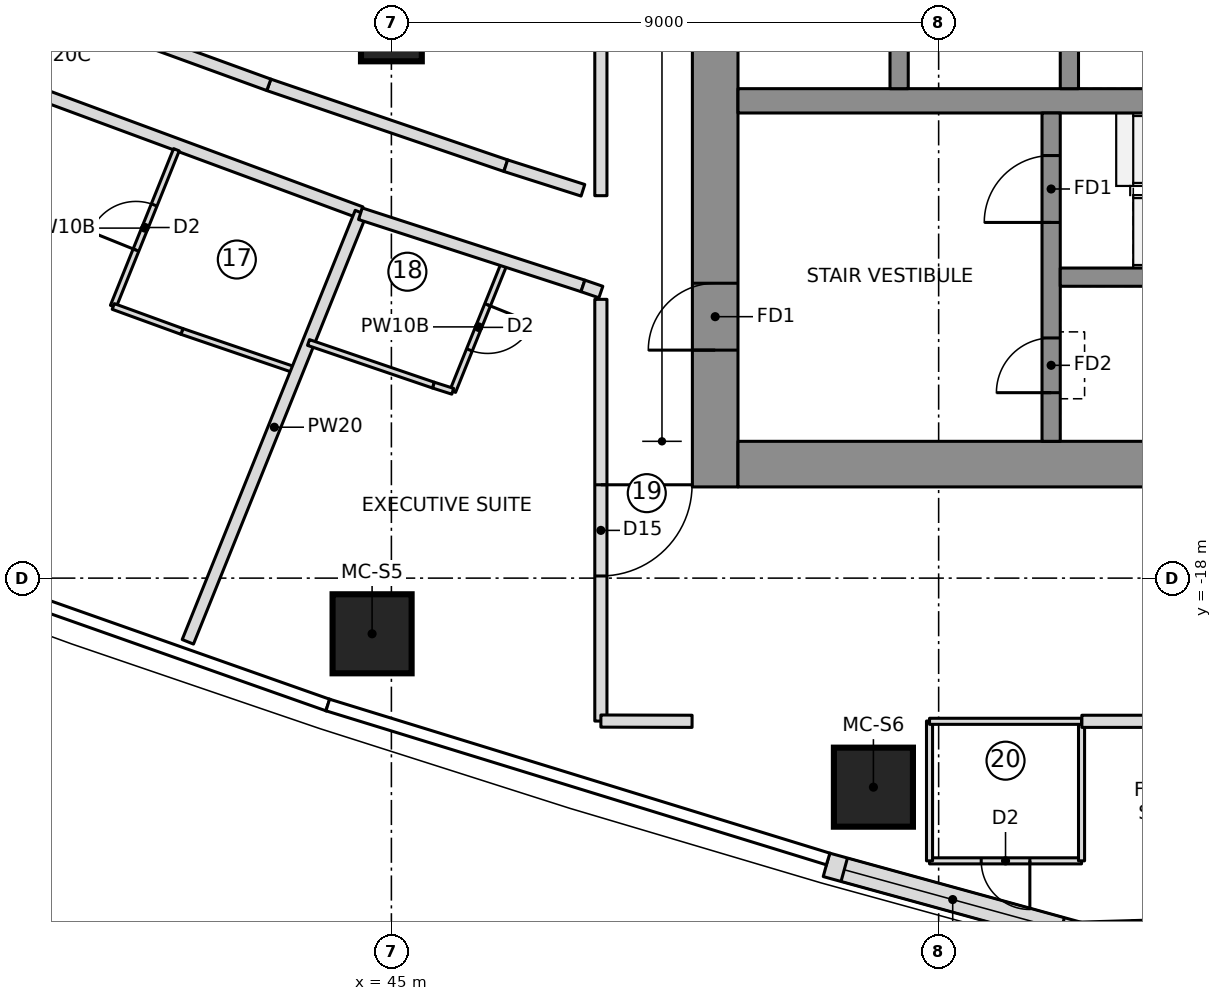
"""IFC4 building model, lengths in metres.
Left out: names, types, materials, properties, quantities, classifications, styles, units other than length and angle.
Written with IfcOpenShell. Run it as: python <this file> out.ifc"""

import sys

from ifc_helpers import new_model, si_unit, direction, frame, frame_2d, origin, origin_2d, place, context, subcontext, project, spatial, polyline, rectangle, outline, extrude, element, fill, save


model = new_model("IFC4")
c1 = context("Model", 3, precision=1e-05, world=origin(), true_north=direction((0.0, 1.0)))
c2 = subcontext(c1, "Body", "Model", "MODEL_VIEW")
j1 = project(units=[si_unit("LENGTHUNIT", "METRE"), si_unit("PLANEANGLEUNIT", "RADIAN")], contexts=[c1])
p1 = place(None, origin())
s1 = spatial("IfcSite", under=j1, at=p1, CompositionType="ELEMENT")
p2 = place(p1, origin())
s2 = spatial("IfcBuilding", under=s1, at=p2, CompositionType="ELEMENT")
p3 = place(p2, frame((0.0, 0.0, 189.7)))
s3 = spatial("IfcBuildingStorey", under=s2, at=p3, CompositionType="ELEMENT", Elevation=189.7)
p4 = place(p3, frame((50.325, -16.5, 0.0), z_axis=(0.0, 0.0, 1.0), x_axis=(0.0, 1.0, 0.0)))
e1 = element("IfcWall", 1, at=p4, inside=s3, PredefinedType="SHEAR", context=c2, shape_type="SweptSolid", body=[
    extrude(rectangle(XDim=9.85, YDim=0.75, at=frame_2d((4.925, 0.0))), origin(), (0.0, 0.0, 1.0), 3.55),
])
p5 = place(p4, frame((2.25, 0.0, 0.0)))
e2 = element("IfcOpeningElement", 2, at=p5, cuts=e1, PredefinedType="OPENING", context=c2, shape_type="SweptSolid", body=[
    extrude(rectangle(XDim=1.1, YDim=2.1, at=frame_2d((0.55, 1.05))), frame((0.0, 0.385, 0.0), z_axis=(0.0, -1.0, 0.0), x_axis=(1.0, 0.0, 0.0)), (0.0, 0.0, 1.0), 0.77),
])
p6 = place(p3, frame((50.7, -16.125, 0.0), z_axis=(0.0, 0.0, 1.0), x_axis=(1.0, 0.0, 0.0)))
e3 = element("IfcWall", 3, at=p6, inside=s3, PredefinedType="SHEAR", context=c2, shape_type="SweptSolid", body=[
    extrude(rectangle(XDim=13.77, YDim=0.75, at=frame_2d((6.885, 0.0))), origin(), (0.0, 0.0, 1.0), 3.55),
])
p7 = place(p3, frame((50.7, -10.15, 0.0), z_axis=(0.0, 0.0, 1.0), x_axis=(1.0, 0.0, 0.0)))
e4 = element("IfcWall", 4, at=p7, inside=s3, PredefinedType="SHEAR", context=c2, shape_type="SweptSolid", body=[
    extrude(rectangle(XDim=13.02, YDim=0.4, at=frame_2d((6.51, 0.0))), origin(), (0.0, 0.0, 1.0), 3.55),
])
for number, where, z_axis, x_axis in (
    (5, (53.35, -9.95, 0.0), (0.0, 0.0, 1.0), (0.0, 1.0, 0.0)),
    (6, (56.15, -9.95, 0.0), (0.0, 0.0, 1.0), (0.0, 1.0, 0.0)),
):
    element("IfcWall", number, at=place(p3, frame(where, z_axis=z_axis, x_axis=x_axis)), inside=s3, PredefinedType="SHEAR", context=c2, shape_type="SweptSolid", body=[
        extrude(rectangle(XDim=3.0, YDim=0.3, at=frame_2d((1.5, 0.0))), origin(), (0.0, 0.0, 1.0), 3.55),
    ])
p8 = place(p3, frame((55.85, -15.75, 0.0), z_axis=(0.0, 0.0, 1.0), x_axis=(0.0, 1.0, 0.0)))
e7 = element("IfcWall", 7, at=p8, inside=s3, PredefinedType="SHEAR", context=c2, shape_type="SweptSolid", body=[
    extrude(rectangle(XDim=5.4, YDim=0.3, at=frame_2d((2.7, 0.0))), origin(), (0.0, 0.0, 1.0), 3.55),
])
p9 = place(p8, frame((3.6, 0.0, 0.0)))
e8 = element("IfcOpeningElement", 8, at=p9, cuts=e7, PredefinedType="OPENING", context=c2, shape_type="SweptSolid", body=[
    extrude(rectangle(XDim=1.1, YDim=2.1, at=frame_2d((0.55, 1.05))), frame((0.0, 0.16, 0.0), z_axis=(0.0, -1.0, 0.0), x_axis=(1.0, 0.0, 0.0)), (0.0, 0.0, 1.0), 0.32),
])
p10 = place(p8, frame((0.8, 0.0, 0.0)))
e9 = element("IfcOpeningElement", 9, at=p10, cuts=e7, PredefinedType="OPENING", context=c2, shape_type="SweptSolid", body=[
    extrude(rectangle(XDim=0.9, YDim=2.1, at=frame_2d((0.45, 1.05))), frame((0.0, 0.16, 0.0), z_axis=(0.0, -1.0, 0.0), x_axis=(1.0, 0.0, 0.0)), (0.0, 0.0, 1.0), 0.32),
])
p11 = place(p3, frame((56.0, -13.05, 0.0), z_axis=(0.0, 0.0, 1.0), x_axis=(1.0, 0.0, 0.0)))
e10 = element("IfcWall", 10, at=p11, inside=s3, PredefinedType="SHEAR", context=c2, shape_type="SweptSolid", body=[
    extrude(rectangle(XDim=7.72, YDim=0.3, at=frame_2d((3.86, 0.0))), origin(), (0.0, 0.0, 1.0), 3.55),
])
for number, where, z_axis, x_axis in (
    (11, (44.683, -18.916, 0.0), (0.0, 0.0, 1.0), (1.0, 0.0, 0.0)),
    (12, (52.927, -21.438, 0.0), (0.0, 0.0, 1.0), (1.0, 0.0, 0.0)),
):
    element("IfcColumn", number, at=place(p3, frame(where, z_axis=z_axis, x_axis=x_axis)), inside=s3, PredefinedType="COLUMN", context=c2, shape_type="SweptSolid", body=[
        extrude(rectangle(XDim=1.3, YDim=1.3, at=origin_2d()), origin(), (0.0, 0.0, 1.0), 3.55),
    ])
p12 = place(p3, frame((45.0, -9.0, 0.0), z_axis=(0.0, 0.0, 1.0), x_axis=(1.0, 0.0, 0.0)))
e13 = element("IfcColumn", 13, at=p12, inside=s3, PredefinedType="COLUMN", context=c2, shape_type="SweptSolid", body=[
    extrude(rectangle(XDim=1.0, YDim=1.0, at=origin_2d()), origin(), (0.0, 0.0, 1.0), 3.55),
])
p13 = place(p3, frame((52.155, -22.716, 0.0), z_axis=(0.0, 0.0, 1.0), x_axis=(0.964205755089, -0.265155165617, 0.0)))
e14 = element("IfcWall", 14, at=p13, inside=s3, PredefinedType="NOTDEFINED", context=c2, shape_type="SweptSolid", body=[
    extrude(outline(polyline([(0.0, -0.2), (4.337, -0.2), (4.277, 0.2), (0.0, 0.2), (0.0, -0.2)])), origin(), (0.0, 0.0, 1.0), 3.25),
])
p14 = place(p13, frame((0.303, 0.0, 0.9)))
e15 = element("IfcOpeningElement", 15, at=p14, cuts=e14, PredefinedType="OPENING", context=c2, shape_type="SweptSolid", body=[
    extrude(rectangle(XDim=3.7, YDim=1.8, at=frame_2d((1.85, 0.9))), frame((0.0, 0.21, 0.0), z_axis=(0.0, -1.0, 0.0), x_axis=(1.0, 0.0, 0.0)), (0.0, 0.0, 1.0), 0.42),
])
p15 = place(p3, frame((56.308, -23.858, 0.0), z_axis=(0.0, 0.0, 1.0), x_axis=(0.999587920197, 0.028705222472, 0.0)))
e16 = element("IfcWall", 16, at=p15, inside=s3, PredefinedType="NOTDEFINED", context=c2, shape_type="SweptSolid", body=[
    extrude(outline(polyline([(-0.03, -0.2), (3.989, -0.2), (3.87, 0.2), (0.03, 0.2), (-0.03, -0.2)])), origin(), (0.0, 0.0, 1.0), 3.25),
])
p16 = place(p15, frame((0.865, 0.0, 0.6)))
e17 = element("IfcOpeningElement", 17, at=p16, cuts=e16, PredefinedType="OPENING", context=c2, shape_type="SweptSolid", body=[
    extrude(outline(polyline([(0.0, 1.35), (0.084, 1.771), (0.322, 2.128), (0.679, 2.366), (1.1, 2.45), (1.521, 2.366), (1.878, 2.128), (2.116, 1.771), (2.2, 1.35), (2.2, 1.1), (2.116, 0.679), (1.878, 0.322), (1.521, 0.084), (1.1, 0.0), (0.679, 0.084), (0.322, 0.322), (0.084, 0.679), (0.0, 1.1), (0.0, 1.35)])), frame((0.0, 0.21, 0.0), z_axis=(0.0, -1.0, 0.0), x_axis=(1.0, 0.0, 0.0)), (0.0, 0.0, 1.0), 0.42),
])
p17 = place(p3, frame((56.35, -22.65, 0.0), z_axis=(0.0, 0.0, 1.0), x_axis=(-1.0, 0.0, 0.0)))
e18 = element("IfcWall", 18, at=p17, inside=s3, PredefinedType="PARTITIONING", context=c2, shape_type="SweptSolid", body=[
    extrude(rectangle(XDim=2.5, YDim=0.1, at=frame_2d((1.25, 0.0))), origin(), (0.0, 0.0, 1.0), 3.25),
])
p18 = place(p17, frame((0.85, 0.0, 0.0)))
e19 = element("IfcOpeningElement", 19, at=p18, cuts=e18, PredefinedType="OPENING", context=c2, shape_type="SweptSolid", body=[
    extrude(rectangle(XDim=0.8, YDim=2.1, at=frame_2d((0.4, 1.05))), frame((0.0, 0.06, 0.0), z_axis=(0.0, -1.0, 0.0), x_axis=(1.0, 0.0, 0.0)), (0.0, 0.0, 1.0), 0.12),
])
for number, where, z_axis, x_axis in (
    (20, (53.85, -22.65, 0.0), (0.0, 0.0, 1.0), (0.0, 1.0, 0.0)),
    (21, (56.35, -20.35, 0.0), (0.0, 0.0, 1.0), (0.0, -1.0, 0.0)),
):
    element("IfcWall", number, at=place(p3, frame(where, z_axis=z_axis, x_axis=x_axis)), inside=s3, PredefinedType="PARTITIONING", context=c2, shape_type="SweptSolid", body=[
        extrude(rectangle(XDim=2.3, YDim=0.1, at=frame_2d((1.15, 0.0))), origin(), (0.0, 0.0, 1.0), 3.25),
    ])
p19 = place(p3, frame((33.801, -8.032, 0.0), z_axis=(0.0, 0.0, 1.0), x_axis=(0.937916242759, -0.346861819127, 0.0)))
e22 = element("IfcWall", 22, at=p19, inside=s3, PredefinedType="PARTITIONING", context=c2, shape_type="SweptSolid", body=[
    extrude(rectangle(XDim=11.405, YDim=0.2, at=frame_2d((5.702, 0.0))), origin(), (0.0, 0.0, 1.0), 3.25),
])
p20 = place(p19, frame((1.15, 0.0, 0.0)))
e23 = element("IfcOpeningElement", 23, at=p20, cuts=e22, PredefinedType="OPENING", context=c2, shape_type="SweptSolid", body=[
    extrude(rectangle(XDim=1.0, YDim=2.1, at=frame_2d((0.5, 1.05))), frame((0.0, 0.11, 0.0), z_axis=(0.0, -1.0, 0.0), x_axis=(1.0, 0.0, 0.0)), (0.0, 0.0, 1.0), 0.22),
])
p21 = place(p3, frame((40.426, -13.532, 0.0), z_axis=(0.0, 0.0, 1.0), x_axis=(0.373889095325, 0.927473419779, 0.0)))
e24 = element("IfcWall", 24, at=p21, inside=s3, PredefinedType="PARTITIONING", context=c2, shape_type="SweptSolid", body=[
    extrude(rectangle(XDim=2.778, YDim=0.1, at=frame_2d((1.389, 0.0))), origin(), (0.0, 0.0, 1.0), 3.25),
])
p22 = place(p21, frame((1.0, 0.0, 0.0)))
e25 = element("IfcOpeningElement", 25, at=p22, cuts=e24, PredefinedType="OPENING", context=c2, shape_type="SweptSolid", body=[
    extrude(rectangle(XDim=0.8, YDim=2.1, at=frame_2d((0.4, 1.05))), frame((0.0, 0.06, 0.0), z_axis=(0.0, -1.0, 0.0), x_axis=(1.0, 0.0, 0.0)), (0.0, 0.0, 1.0), 0.12),
])
p23 = place(p3, frame((43.449, -14.589, 0.0), z_axis=(0.0, 0.0, 1.0), x_axis=(-0.94641533286, 0.322952036265, 0.0)))
e26 = element("IfcWall", 26, at=p23, inside=s3, PredefinedType="PARTITIONING", context=c2, shape_type="SweptSolid", body=[
    extrude(rectangle(XDim=2.002, YDim=0.1, at=frame_2d((1.001, 0.0))), origin(), (0.0, 0.0, 1.0), 3.25),
])
p24 = place(p3, frame((41.555, -13.943, 0.0), z_axis=(0.0, 0.0, 1.0), x_axis=(-0.939781557461, 0.341775692897, 0.0)))
e27 = element("IfcWall", 27, at=p24, inside=s3, PredefinedType="PARTITIONING", context=c2, shape_type="SweptSolid", body=[
    extrude(rectangle(XDim=1.201, YDim=0.1, at=frame_2d((0.601, 0.0))), origin(), (0.0, 0.0, 1.0), 3.25),
])
p25 = place(p3, frame((41.652, -19.048, 0.0), z_axis=(0.0, 0.0, 1.0), x_axis=(0.373877998371, 0.927477893178, 0.0)))
e28 = element("IfcWall", 28, at=p25, inside=s3, PredefinedType="PARTITIONING", context=c2, shape_type="SweptSolid", body=[
    extrude(rectangle(XDim=7.611, YDim=0.2, at=frame_2d((3.806, 0.0))), origin(), (0.0, 0.0, 1.0), 3.25),
])
p26 = place(p3, frame((46.863, -12.809, 0.0), z_axis=(0.0, 0.0, 1.0), x_axis=(-0.373877855241, -0.927477950876, 0.0)))
e29 = element("IfcWall", 29, at=p26, inside=s3, PredefinedType="PARTITIONING", context=c2, shape_type="SweptSolid", body=[
    extrude(rectangle(XDim=2.283, YDim=0.1, at=frame_2d((1.142, 0.0))), origin(), (0.0, 0.0, 1.0), 3.25),
])
p27 = place(p26, frame((0.75, 0.0, 0.0)))
e30 = element("IfcOpeningElement", 30, at=p27, cuts=e29, PredefinedType="OPENING", context=c2, shape_type="SweptSolid", body=[
    extrude(rectangle(XDim=0.8, YDim=2.1, at=frame_2d((0.4, 1.05))), frame((0.0, 0.06, 0.0), z_axis=(0.0, -1.0, 0.0), x_axis=(1.0, 0.0, 0.0)), (0.0, 0.0, 1.0), 0.12),
])
p28 = place(p3, frame((46.009, -14.927, 0.0), z_axis=(0.0, 0.0, 1.0), x_axis=(-0.952618746207, 0.304166935045, 0.0)))
e31 = element("IfcWall", 31, at=p28, inside=s3, PredefinedType="PARTITIONING", context=c2, shape_type="SweptSolid", body=[
    extrude(rectangle(XDim=0.335, YDim=0.1, at=frame_2d((0.167, 0.0))), origin(), (0.0, 0.0, 1.0), 3.25),
])
p29 = place(p3, frame((45.69, -14.825, 0.0), z_axis=(0.0, 0.0, 1.0), x_axis=(-0.946442988685, 0.322870979136, 0.0)))
e32 = element("IfcWall", 32, at=p29, inside=s3, PredefinedType="PARTITIONING", context=c2, shape_type="SweptSolid", body=[
    extrude(rectangle(XDim=2.169, YDim=0.1, at=frame_2d((1.085, 0.0))), origin(), (0.0, 0.0, 1.0), 3.25),
])
for number, where, z_axis, x_axis in (
    (33, (46.881, -11.217, 0.0), (0.0, 0.0, 1.0), (-0.946, 0.323, 0.0)),
    (34, (42.984, -9.887, 0.0), (0.0, 0.0, 1.0), (-0.94, 0.342, 0.0)),
):
    element("IfcWall", number, at=place(p3, frame(where, z_axis=z_axis, x_axis=x_axis)), inside=s3, PredefinedType="PARTITIONING", context=c2, shape_type="SweptSolid", body=[
        extrude(rectangle(XDim=4.117, YDim=0.2, at=frame_2d((2.059, 0.0))), origin(), (0.0, 0.0, 1.0), 3.25),
    ])
p30 = place(p3, frame((56.355, -20.355, 0.0), z_axis=(0.0, 0.0, 1.0), x_axis=(1.0, 0.0, 0.0)))
e35 = element("IfcWall", 35, at=p30, inside=s3, PredefinedType="PARTITIONING", context=c2, shape_type="SweptSolid", body=[
    extrude(rectangle(XDim=7.354, YDim=0.2, at=frame_2d((3.677, 0.0))), origin(), (0.0, 0.0, 1.0), 3.25),
])
p31 = place(p30, frame((2.624, 0.0, 0.0)))
e36 = element("IfcOpeningElement", 36, at=p31, cuts=e35, PredefinedType="OPENING", context=c2, shape_type="SweptSolid", body=[
    extrude(rectangle(XDim=1.5, YDim=2.1, at=frame_2d((0.75, 1.05))), frame((0.0, 0.11, 0.0), z_axis=(0.0, -1.0, 0.0), x_axis=(1.0, 0.0, 0.0)), (0.0, 0.0, 1.0), 0.22),
])
p32 = place(p3, frame((53.85, -20.355, 0.0), z_axis=(0.0, 0.0, 1.0), x_axis=(1.0, 0.0, 0.0)))
e37 = element("IfcWall", 37, at=p32, inside=s3, PredefinedType="PARTITIONING", context=c2, shape_type="SweptSolid", body=[
    extrude(rectangle(XDim=2.5, YDim=0.1, at=frame_2d((1.25, 0.0))), origin(), (0.0, 0.0, 1.0), 3.25),
])
p33 = place(p3, frame((44.49, -12.007, 0.0), z_axis=(0.0, 0.0, 1.0), x_axis=(0.951228355446, -0.308487626648, 0.0)))
e38 = element("IfcWall", 38, at=p33, inside=s3, PredefinedType="PARTITIONING", context=c2, shape_type="SweptSolid", body=[
    extrude(rectangle(XDim=3.847, YDim=0.2, at=frame_2d((1.924, 0.0))), origin(), (0.0, 0.0, 1.0), 3.25),
])
p34 = place(p3, frame((48.15, -11.621, 0.0), z_axis=(0.0, 0.0, 1.0), x_axis=(-0.952761948983, 0.303718074157, 0.0)))
e39 = element("IfcWall", 39, at=p34, inside=s3, PredefinedType="PARTITIONING", context=c2, shape_type="SweptSolid", body=[
    extrude(rectangle(XDim=1.332, YDim=0.2, at=frame_2d((0.666, 0.0))), origin(), (0.0, 0.0, 1.0), 3.25),
])
p35 = place(p3, frame((48.445, 11.71, 0.0), z_axis=(0.0, 0.0, 1.0), x_axis=(0.0, -1.0, 0.0)))
e40 = element("IfcWall", 40, at=p35, inside=s3, PredefinedType="PARTITIONING", context=c2, shape_type="SweptSolid", body=[
    extrude(rectangle(XDim=23.42, YDim=0.2, at=frame_2d((11.71, 0.0))), origin(), (0.0, 0.0, 1.0), 3.25),
])
p36 = place(p3, frame((48.15, -13.194, 0.0), z_axis=(0.0, 0.0, 1.0), x_axis=(0.946069343286, -0.323964191994, 0.0)))
e41 = element("IfcWall", 41, at=p36, inside=s3, PredefinedType="PARTITIONING", context=c2, shape_type="SweptSolid", body=[
    extrude(rectangle(XDim=0.312, YDim=0.2, at=frame_2d((0.156, 0.0))), origin(), (0.0, 0.0, 1.0), 3.25),
])
p37 = place(p3, frame((48.445, -13.415, 0.0), z_axis=(0.0, 0.0, 1.0), x_axis=(0.0, -1.0, 0.0)))
e42 = element("IfcWall", 42, at=p37, inside=s3, PredefinedType="PARTITIONING", context=c2, shape_type="SweptSolid", body=[
    extrude(rectangle(XDim=6.936, YDim=0.2, at=frame_2d((3.468, 0.0))), origin(), (0.0, 0.0, 1.0), 3.25),
])
p38 = place(p37, frame((3.05, 0.0, 0.0)))
e43 = element("IfcOpeningElement", 43, at=p38, cuts=e42, PredefinedType="OPENING", context=c2, shape_type="SweptSolid", body=[
    extrude(rectangle(XDim=1.5, YDim=2.1, at=frame_2d((0.75, 1.05))), frame((0.0, 0.11, 0.0), z_axis=(0.0, -1.0, 0.0), x_axis=(1.0, 0.0, 0.0)), (0.0, 0.0, 1.0), 0.22),
])
p39 = place(p3, frame((48.445, -20.351, 0.0), z_axis=(0.0, 0.0, 1.0), x_axis=(0.999996609175, -0.002604157836, 0.0)))
e44 = element("IfcWall", 44, at=p39, inside=s3, PredefinedType="PARTITIONING", context=c2, shape_type="SweptSolid", body=[
    extrude(rectangle(XDim=1.5, YDim=0.2, at=frame_2d((0.75, 0.0))), origin(), (0.0, 0.0, 1.0), 3.25),
])
p40 = place(p14, origin())
e45 = element("IfcWindow", 45, at=p40, inside=s3, PartitioningType="SINGLE_PANEL", PredefinedType="WINDOW", context=c2, shape_type="SweptSolid", body=[
    extrude(rectangle(XDim=3.7, YDim=1.8, at=frame_2d((1.85, 0.9))), frame((0.0, 0.17, 0.0), z_axis=(0.0, -1.0, 0.0), x_axis=(1.0, 0.0, 0.0)), (0.0, 0.0, 1.0), 0.06),
])
fill(e15, e45)
p41 = place(p16, origin())
e46 = element("IfcWindow", 46, at=p41, inside=s3, PartitioningType="SINGLE_PANEL", PredefinedType="WINDOW", context=c2, shape_type="SweptSolid", body=[
    extrude(outline(polyline([(0.0, 1.35), (0.084, 1.771), (0.322, 2.128), (0.679, 2.366), (1.1, 2.45), (1.521, 2.366), (1.878, 2.128), (2.116, 1.771), (2.2, 1.35), (2.2, 1.1), (2.116, 0.679), (1.878, 0.322), (1.521, 0.084), (1.1, 0.0), (0.679, 0.084), (0.322, 0.322), (0.084, 0.679), (0.0, 1.1), (0.0, 1.35)])), frame((0.0, 0.17, 0.0), z_axis=(0.0, -1.0, 0.0), x_axis=(1.0, 0.0, 0.0)), (0.0, 0.0, 1.0), 0.06),
])
fill(e17, e46)
p42 = place(p18, origin())
e47 = element("IfcDoor", 47, at=p42, inside=s3, OperationType="SINGLE_SWING_LEFT", PredefinedType="DOOR", context=c2, shape_type="SweptSolid", body=[
    extrude(rectangle(XDim=0.8, YDim=2.1, at=frame_2d((0.4, 1.05))), frame((0.0, 0.025, 0.0), z_axis=(0.0, -1.0, 0.0), x_axis=(1.0, 0.0, 0.0)), (0.0, 0.0, 1.0), 0.05),
])
fill(e19, e47)
p43 = place(p22, origin())
e48 = element("IfcDoor", 48, at=p43, inside=s3, OperationType="SINGLE_SWING_LEFT", PredefinedType="DOOR", context=c2, shape_type="SweptSolid", body=[
    extrude(rectangle(XDim=0.8, YDim=2.1, at=frame_2d((0.4, 1.05))), frame((0.0, 0.025, 0.0), z_axis=(0.0, -1.0, 0.0), x_axis=(1.0, 0.0, 0.0)), (0.0, 0.0, 1.0), 0.05),
])
fill(e25, e48)
p44 = place(p27, origin())
e49 = element("IfcDoor", 49, at=p44, inside=s3, OperationType="SINGLE_SWING_LEFT", PredefinedType="DOOR", context=c2, shape_type="SweptSolid", body=[
    extrude(rectangle(XDim=0.8, YDim=2.1, at=frame_2d((0.4, 1.05))), frame((0.0, 0.025, 0.0), z_axis=(0.0, -1.0, 0.0), x_axis=(1.0, 0.0, 0.0)), (0.0, 0.0, 1.0), 0.05),
])
fill(e30, e49)
p45 = place(p38, origin())
e50 = element("IfcDoor", 50, at=p45, inside=s3, OperationType="DOUBLE_DOOR_SINGLE_SWING", PredefinedType="DOOR", context=c2, shape_type="SweptSolid", body=[
    extrude(rectangle(XDim=1.5, YDim=2.1, at=frame_2d((0.75, 1.05))), frame((0.0, 0.025, 0.0), z_axis=(0.0, -1.0, 0.0), x_axis=(1.0, 0.0, 0.0)), (0.0, 0.0, 1.0), 0.05),
])
fill(e43, e50)
p46 = place(p9, origin())
e51 = element("IfcDoor", 51, at=p46, inside=s3, OperationType="SINGLE_SWING_RIGHT", PredefinedType="DOOR", context=c2, shape_type="SweptSolid", body=[
    extrude(rectangle(XDim=1.1, YDim=2.1, at=frame_2d((0.55, 1.05))), frame((0.0, 0.025, 0.0), z_axis=(0.0, -1.0, 0.0), x_axis=(1.0, 0.0, 0.0)), (0.0, 0.0, 1.0), 0.05),
])
fill(e8, e51)
p47 = place(p5, origin())
e52 = element("IfcDoor", 52, at=p47, inside=s3, OperationType="SINGLE_SWING_RIGHT", PredefinedType="DOOR", context=c2, shape_type="SweptSolid", body=[
    extrude(rectangle(XDim=1.1, YDim=2.1, at=frame_2d((0.55, 1.05))), frame((0.0, 0.025, 0.0), z_axis=(0.0, -1.0, 0.0), x_axis=(1.0, 0.0, 0.0)), (0.0, 0.0, 1.0), 0.05),
])
fill(e2, e52)
p48 = place(p10, origin())
e53 = element("IfcDoor", 53, at=p48, inside=s3, OperationType="SINGLE_SWING_LEFT", PredefinedType="DOOR", context=c2, shape_type="SweptSolid", body=[
    extrude(rectangle(XDim=0.9, YDim=2.1, at=frame_2d((0.45, 1.05))), frame((0.0, 0.025, 0.0), z_axis=(0.0, -1.0, 0.0), x_axis=(1.0, 0.0, 0.0)), (0.0, 0.0, 1.0), 0.05),
])
fill(e9, e53)
save(model, sys.argv[1])
